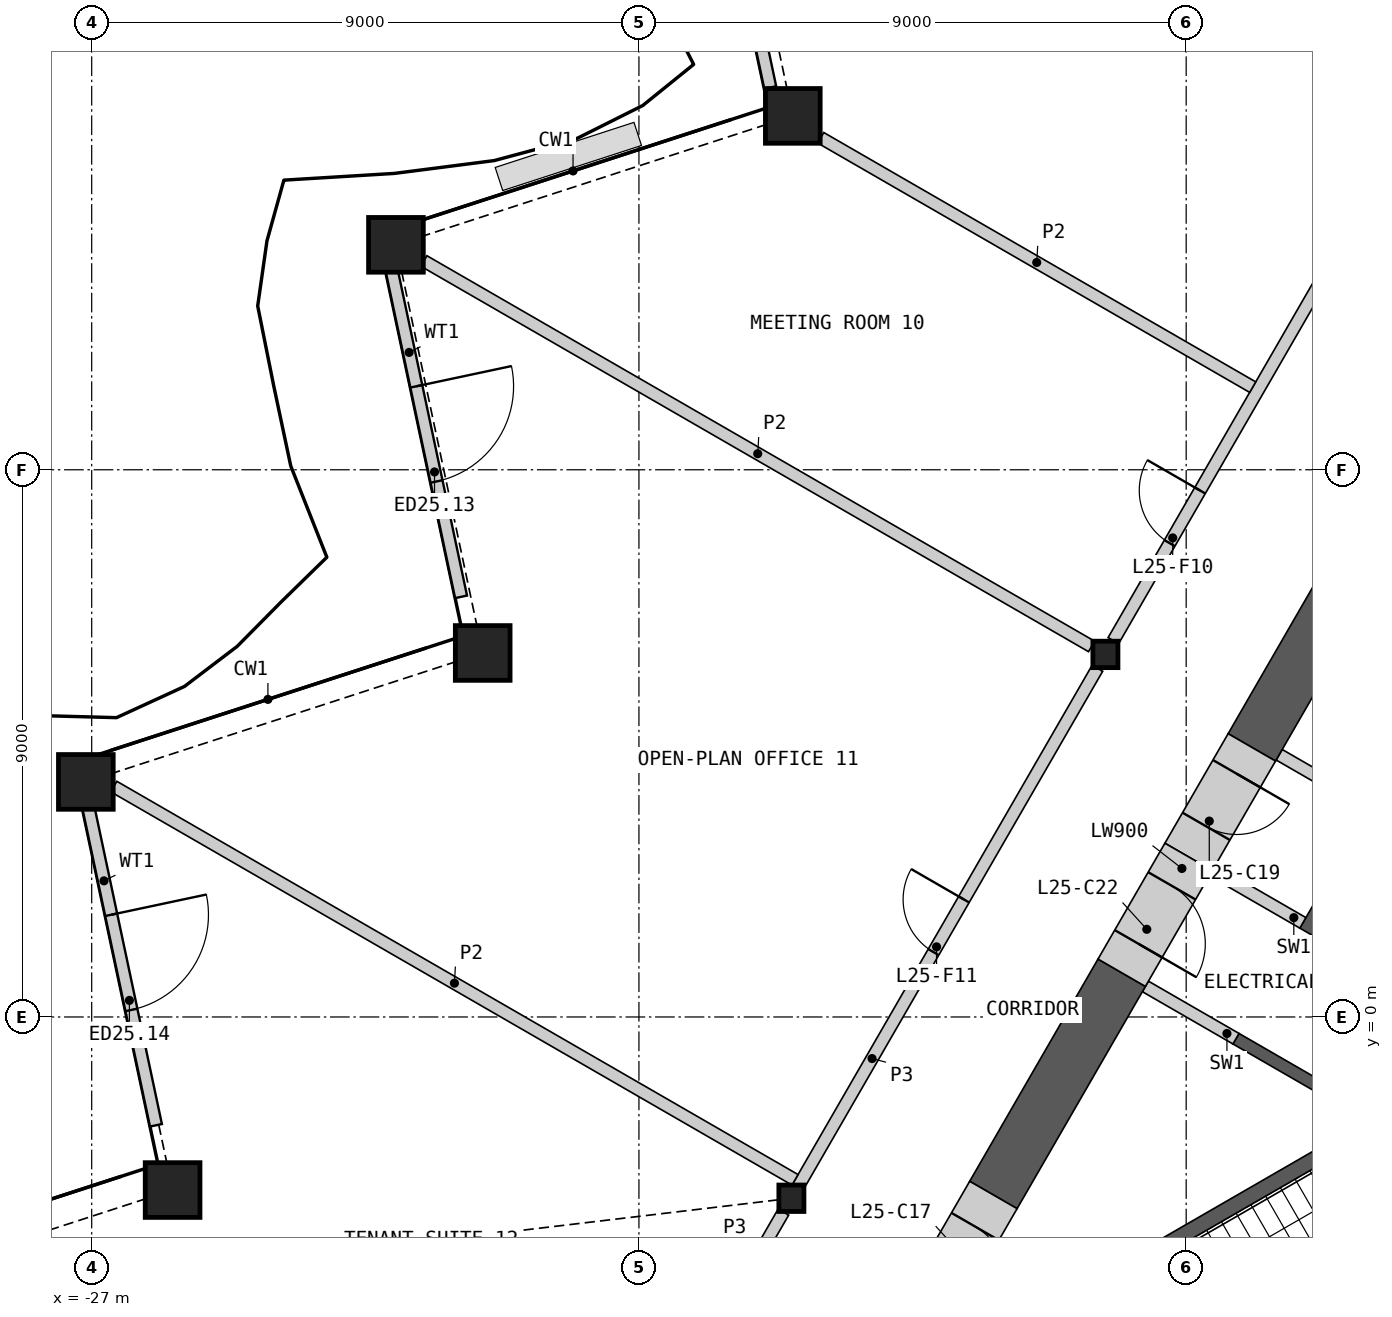
"""IFC4 building model, lengths in metres.
Left out: names, types, materials, properties, quantities, classifications, styles, units other than length and angle.
Written with IfcOpenShell. Run it as: python <this file> out.ifc"""

import sys

from ifc_helpers import new_model, si_unit, direction, frame, frame_2d, origin, origin_2d, place, context, subcontext, project, spatial, polyline, rectangle, hollow_rectangle, i_section, outline, extrude, element, fill, save


model = new_model("IFC4")
c1 = context("Model", 3, precision=1e-05, world=origin(), true_north=direction((0.0, 1.0)))
c2 = subcontext(c1, "Body", "Model", "MODEL_VIEW")
j1 = project(units=[si_unit("LENGTHUNIT", "METRE"), si_unit("PLANEANGLEUNIT", "RADIAN")], contexts=[c1])
p1 = place(None, origin())
s1 = spatial("IfcSite", under=j1, at=p1, CompositionType="ELEMENT")
p2 = place(p1, origin())
s2 = spatial("IfcBuilding", under=s1, at=p2, CompositionType="ELEMENT")
p3 = place(p2, frame((0.0, 0.0, 120.6)))
s3 = spatial("IfcBuildingStorey", under=s2, at=p3, CompositionType="ELEMENT", Elevation=120.6)
for number, where, z_axis, x_axis in (
    (1, (-15.469, 14.82, 0.0), (0.0, 0.0, 1.0), (1.0, 0.0, 0.0)),
    (2, (-21.996, 12.699, 0.0), (0.0, 0.0, 1.0), (1.0, 0.0, 0.0)),
    (3, (-20.57, 5.987, 0.0), (0.0, 0.0, 1.0), (1.0, 0.0, 0.0)),
    (4, (-27.096, 3.866, 0.0), (0.0, 0.0, 1.0), (1.0, 0.0, 0.0)),
    (5, (-25.669, -2.846, 0.0), (0.0, 0.0, 1.0), (1.0, 0.0, 0.0)),
):
    element("IfcColumn", number, at=place(p3, frame(where, z_axis=z_axis, x_axis=x_axis)), inside=s3, PredefinedType="COLUMN", context=c2, shape_type="SweptSolid", body=[
        extrude(hollow_rectangle(XDim=0.9, YDim=0.9, WallThickness=0.06, at=origin_2d()), origin(), (0.0, 0.0, 1.0), 4.2),
    ])
for number, where, z_axis, x_axis in (
    (6, (-10.328, 5.963, 0.0), (0.0, 0.0, 1.0), (1.0, 0.0, 0.0)),
    (7, (-15.493, -2.982, 0.0), (0.0, 0.0, 1.0), (1.0, 0.0, 0.0)),
):
    element("IfcColumn", number, at=place(p3, frame(where, z_axis=z_axis, x_axis=x_axis)), inside=s3, PredefinedType="COLUMN", context=c2, shape_type="SweptSolid", body=[
        extrude(i_section(OverallWidth=0.412, OverallDepth=0.435, WebThickness=0.036, FlangeThickness=0.057, at=origin_2d()), origin(), (0.0, 0.0, 1.0), 4.2),
    ])
p4 = place(p3, frame((-17.069, 21.066, 0.0), z_axis=(0.0, 0.0, 1.0), x_axis=(0.207917562075, -0.978146352741, 0.0)))
e8 = element("IfcWall", 8, at=p4, inside=s3, PredefinedType="SOLIDWALL", context=c2, shape_type="SweptSolid", body=[
    extrude(rectangle(XDim=5.909, YDim=0.2, at=frame_2d((2.954, 0.0))), origin(), (0.0, 0.0, 1.0), 3.189),
])
p5 = place(p4, frame((2.047, 0.0, 0.0)))
e9 = element("IfcOpeningElement", 9, at=p5, cuts=e8, PredefinedType="OPENING", context=c2, shape_type="SweptSolid", body=[
    extrude(rectangle(XDim=1.6, YDim=2.4, at=frame_2d((0.8, 1.2))), frame((0.0, 0.11, 0.0), z_axis=(0.0, -1.0, 0.0), x_axis=(1.0, 0.0, 0.0)), (0.0, 0.0, 1.0), 0.22),
])
p6 = place(p3, frame((-22.065, 12.271, 0.0), z_axis=(0.0, 0.0, 1.0), x_axis=(0.207907239961, -0.978148546782, 0.0)))
e10 = element("IfcWall", 10, at=p6, inside=s3, PredefinedType="SOLIDWALL", context=c2, shape_type="SweptSolid", body=[
    extrude(rectangle(XDim=5.48, YDim=0.2, at=frame_2d((2.74, 0.0))), origin(), (0.0, 0.0, 1.0), 3.189),
])
p7 = place(p6, frame((1.94, 0.0, 0.0)))
e11 = element("IfcOpeningElement", 11, at=p7, cuts=e10, PredefinedType="OPENING", context=c2, shape_type="SweptSolid", body=[
    extrude(rectangle(XDim=1.6, YDim=2.4, at=frame_2d((0.8, 1.2))), frame((0.0, 0.11, 0.0), z_axis=(0.0, -1.0, 0.0), x_axis=(1.0, 0.0, 0.0)), (0.0, 0.0, 1.0), 0.22),
])
p8 = place(p3, frame((-27.083, 3.579, 0.0), z_axis=(0.0, 0.0, 1.0), x_axis=(0.207898180805, -0.978150472278, 0.0)))
e12 = element("IfcWall", 12, at=p8, inside=s3, PredefinedType="SOLIDWALL", context=c2, shape_type="SweptSolid", body=[
    extrude(rectangle(XDim=5.48, YDim=0.2, at=frame_2d((2.74, 0.0))), origin(), (0.0, 0.0, 1.0), 3.189),
])
p9 = place(p8, frame((1.94, 0.0, 0.0)))
e13 = element("IfcOpeningElement", 13, at=p9, cuts=e12, PredefinedType="OPENING", context=c2, shape_type="SweptSolid", body=[
    extrude(rectangle(XDim=1.6, YDim=2.4, at=frame_2d((0.8, 1.2))), frame((0.0, 0.11, 0.0), z_axis=(0.0, -1.0, 0.0), x_axis=(1.0, 0.0, 0.0)), (0.0, 0.0, 1.0), 0.22),
])
p10 = place(p3, origin())
e14 = element("IfcWall", 14, at=p10, inside=s3, PredefinedType="SHEAR", context=c2, shape_type="SweptSolid", body=[
    extrude(outline(polyline([(-6.061, -1.697), (-8.231, -0.444), (-8.131, -0.271), (-5.96, -1.524), (-6.061, -1.697)])), origin(), (0.0, 0.0, 1.0), 3.8),
])
p11 = place(p3, origin())
e15 = element("IfcWall", 15, at=p11, inside=s3, PredefinedType="SHEAR", context=c2, shape_type="SweptSolid", body=[
    extrude(outline(polyline([(-4.96, 0.208), (-7.131, 1.461), (-5.931, 3.54), (-3.76, 2.287), (-3.861, 2.113), (-5.852, 3.263), (-6.852, 1.531), (-4.861, 0.381), (-4.96, 0.208)])), origin(), (0.0, 0.0, 1.0), 3.8),
])
p12 = place(p3, frame((-5.981, 3.453, 0.0), z_axis=(0.0, 0.0, 1.0), x_axis=(-0.866060346521, 0.499939472521, 0.0)))
e16 = element("IfcWall", 16, at=p12, inside=s3, PredefinedType="SHEAR", context=c2, shape_type="SweptSolid", body=[
    extrude(rectangle(XDim=1.72, YDim=0.2, at=frame_2d((0.86, 0.0))), origin(), (0.0, 0.0, 1.0), 3.8),
])
for number, where, z_axis, x_axis in (
    (17, (-7.081, 1.548, 0.0), (0.0, 0.0, 1.0), (-0.866, 0.5, 0.0)),
    (18, (-8.181, -0.357, 0.0), (0.0, 0.0, 1.0), (-0.866, 0.5, 0.0)),
):
    element("IfcWall", number, at=place(p3, frame(where, z_axis=z_axis, x_axis=x_axis)), inside=s3, PredefinedType="SHEAR", context=c2, shape_type="SweptSolid", body=[
        extrude(rectangle(XDim=1.72, YDim=0.2, at=frame_2d((0.86, 0.0))), origin(), (0.0, 0.0, 1.0), 3.8),
    ])
p13 = place(p3, origin())
e19 = element("IfcWall", 19, at=p13, inside=s3, PredefinedType="SHEAR", context=c2, shape_type="SweptSolid", body=[
    extrude(outline(polyline([(-5.307, -1.281), (-10.374, -4.206), (-10.032, -4.298), (-5.182, -1.498), (-5.307, -1.281)])), origin(), (0.0, 0.0, 1.0), 3.8),
])
p14 = place(p3, frame((-3.55, 12.004, 0.0), z_axis=(0.0, 0.0, 1.0), x_axis=(-0.499993245289, -0.866029303583, 0.0)))
e20 = element("IfcWall", 20, at=p14, inside=s3, PredefinedType="SHEAR", context=c2, shape_type="SweptSolid", body=[
    extrude(rectangle(XDim=8.741, YDim=0.9, at=frame_2d((4.37, 0.0))), origin(), (0.0, 0.0, 1.0), 3.8),
])
p15 = place(p3, frame((-10.06, 0.728, 0.0), z_axis=(0.0, 0.0, 1.0), x_axis=(-0.500021220092, -0.866013152012, 0.0)))
e21 = element("IfcWall", 21, at=p15, inside=s3, PredefinedType="SHEAR", context=c2, shape_type="SweptSolid", body=[
    extrude(rectangle(XDim=4.22, YDim=0.9, at=frame_2d((2.11, 0.0))), origin(), (0.0, 0.0, 1.0), 3.8),
])
p16 = place(p3, frame((-12.171, -2.927, 0.0), z_axis=(0.0, 0.0, 1.0), x_axis=(-0.499946605688, -0.86605622881, 0.0)))
e22 = element("IfcWall", 22, at=p16, inside=s3, PredefinedType="SHEAR", context=c2, shape_type="SweptSolid", body=[
    extrude(rectangle(XDim=2.2, YDim=0.9, at=frame_2d((1.1, 0.0))), origin(), (0.0, 0.0, 1.0), 3.8),
])
p17 = place(p16, frame((0.6, 0.0, 0.0)))
e23 = element("IfcOpeningElement", 23, at=p17, cuts=e22, PredefinedType="OPENING", context=c2, shape_type="SweptSolid", body=[
    extrude(rectangle(XDim=1.0, YDim=2.1, at=frame_2d((0.5, 1.05))), frame((0.0, 0.46, 0.0), z_axis=(0.0, -1.0, 0.0), x_axis=(1.0, 0.0, 0.0)), (0.0, 0.0, 1.0), 0.92),
])
p18 = place(p3, frame((-7.92, 4.434, 0.0), z_axis=(0.0, 0.0, 1.0), x_axis=(-0.499939227269, -0.866060488094, 0.0)))
e24 = element("IfcWall", 24, at=p18, inside=s3, PredefinedType="SHEAR", context=c2, shape_type="SweptSolid", body=[
    extrude(rectangle(XDim=2.08, YDim=0.9, at=frame_2d((1.04, 0.0))), origin(), (0.0, 0.0, 1.0), 3.8),
])
p19 = place(p18, frame((0.5, 0.0, 0.0)))
e25 = element("IfcOpeningElement", 25, at=p19, cuts=e24, PredefinedType="OPENING", context=c2, shape_type="SweptSolid", body=[
    extrude(rectangle(XDim=1.0, YDim=2.1, at=frame_2d((0.5, 1.05))), frame((0.0, 0.46, 0.0), z_axis=(0.0, -1.0, 0.0), x_axis=(1.0, 0.0, 0.0)), (0.0, 0.0, 1.0), 0.92),
])
p20 = place(p3, frame((-8.96, 2.633, 0.0), z_axis=(0.0, 0.0, 1.0), x_axis=(-0.50002983664, -0.866008176907, 0.0)))
e26 = element("IfcWall", 26, at=p20, inside=s3, PredefinedType="SHEAR", context=c2, shape_type="SweptSolid", body=[
    extrude(rectangle(XDim=2.2, YDim=0.9, at=frame_2d((1.1, 0.0))), origin(), (0.0, 0.0, 1.0), 3.8),
])
p21 = place(p20, frame((0.55, 0.0, 0.0)))
e27 = element("IfcOpeningElement", 27, at=p21, cuts=e26, PredefinedType="OPENING", context=c2, shape_type="SweptSolid", body=[
    extrude(rectangle(XDim=1.1, YDim=2.1, at=frame_2d((0.55, 1.05))), frame((0.0, 0.46, 0.0), z_axis=(0.0, -1.0, 0.0), x_axis=(1.0, 0.0, 0.0)), (0.0, 0.0, 1.0), 0.92),
])
p22 = place(p3, frame((-10.197, 6.19, 0.0), z_axis=(0.0, 0.0, 1.0), x_axis=(0.500012035596, 0.866018454918, 0.0)))
e28 = element("IfcWall", 28, at=p22, inside=s3, PredefinedType="PARTITIONING", context=c2, shape_type="SweptSolid", body=[
    extrude(rectangle(XDim=9.803, YDim=0.2, at=frame_2d((4.902, 0.0))), origin(), (0.0, 0.0, 1.0), 3.8),
])
p23 = place(p22, frame((1.851, 0.0, 0.0)))
e29 = element("IfcOpeningElement", 29, at=p23, cuts=e28, PredefinedType="OPENING", context=c2, shape_type="SweptSolid", body=[
    extrude(rectangle(XDim=1.0, YDim=2.1, at=frame_2d((0.5, 1.05))), frame((0.0, 0.11, 0.0), z_axis=(0.0, -1.0, 0.0), x_axis=(1.0, 0.0, 0.0)), (0.0, 0.0, 1.0), 0.22),
])
p24 = place(p3, frame((-15.402, -2.823, 0.0), z_axis=(0.0, 0.0, 1.0), x_axis=(0.500023237168, 0.866011987384, 0.0)))
e30 = element("IfcWall", 30, at=p24, inside=s3, PredefinedType="PARTITIONING", context=c2, shape_type="SweptSolid", body=[
    extrude(rectangle(XDim=9.883, YDim=0.2, at=frame_2d((4.942, 0.0))), origin(), (0.0, 0.0, 1.0), 3.8),
])
p25 = place(p24, frame((4.492, 0.0, 0.0)))
e31 = element("IfcOpeningElement", 31, at=p25, cuts=e30, PredefinedType="OPENING", context=c2, shape_type="SweptSolid", body=[
    extrude(rectangle(XDim=1.0, YDim=2.1, at=frame_2d((0.5, 1.05))), frame((0.0, 0.11, 0.0), z_axis=(0.0, -1.0, 0.0), x_axis=(1.0, 0.0, 0.0)), (0.0, 0.0, 1.0), 0.22),
])
p26 = place(p3, frame((-18.744, -8.613, 0.0), z_axis=(0.0, 0.0, 1.0), x_axis=(0.499997920671, 0.866026604282, 0.0)))
e32 = element("IfcWall", 32, at=p26, inside=s3, PredefinedType="PARTITIONING", context=c2, shape_type="SweptSolid", body=[
    extrude(rectangle(XDim=6.24, YDim=0.2, at=frame_2d((3.12, 0.0))), origin(), (0.0, 0.0, 1.0), 3.8),
])
p27 = place(p26, frame((2.67, 0.0, 0.0)))
e33 = element("IfcOpeningElement", 33, at=p27, cuts=e32, PredefinedType="OPENING", context=c2, shape_type="SweptSolid", body=[
    extrude(rectangle(XDim=1.0, YDim=2.1, at=frame_2d((0.5, 1.05))), frame((0.0, 0.11, 0.0), z_axis=(0.0, -1.0, 0.0), x_axis=(1.0, 0.0, 0.0)), (0.0, 0.0, 1.0), 0.22),
])
p28 = place(p3, frame((-26.636, 3.79, 0.0), z_axis=(0.0, 0.0, 1.0), x_axis=(0.866029074283, -0.499993642455, 0.0)))
e34 = element("IfcWall", 34, at=p28, inside=s3, PredefinedType="PARTITIONING", context=c2, shape_type="SweptSolid", body=[
    extrude(rectangle(XDim=12.936, YDim=0.2, at=frame_2d((6.468, 0.0))), origin(), (0.0, 0.0, 1.0), 2.885),
])
p29 = place(p3, frame((-21.536, 12.434, 0.0), z_axis=(0.0, 0.0, 1.0), x_axis=(0.86602461759, -0.500001361726, 0.0)))
e35 = element("IfcWall", 35, at=p29, inside=s3, PredefinedType="PARTITIONING", context=c2, shape_type="SweptSolid", body=[
    extrude(rectangle(XDim=12.679, YDim=0.2, at=frame_2d((6.34, 0.0))), origin(), (0.0, 0.0, 1.0), 2.885),
])
p30 = place(p3, frame((-15.01, 14.46, 0.0), z_axis=(0.0, 0.0, 1.0), x_axis=(0.86602003489, -0.500009299083, 0.0)))
e36 = element("IfcWall", 36, at=p30, inside=s3, PredefinedType="PARTITIONING", context=c2, shape_type="SweptSolid", body=[
    extrude(rectangle(XDim=8.202, YDim=0.2, at=frame_2d((4.101, 0.0))), origin(), (0.0, 0.0, 1.0), 2.885),
])
p31 = place(p7, origin())
e37 = element("IfcDoor", 37, at=p31, inside=s3, OperationType="DOUBLE_DOOR_SINGLE_SWING", PredefinedType="DOOR", context=c2, shape_type="SweptSolid", body=[
    extrude(rectangle(XDim=1.6, YDim=2.4, at=frame_2d((0.8, 1.2))), frame((0.0, 0.025, 0.0), z_axis=(0.0, -1.0, 0.0), x_axis=(1.0, 0.0, 0.0)), (0.0, 0.0, 1.0), 0.05),
])
fill(e11, e37)
p32 = place(p9, origin())
e38 = element("IfcDoor", 38, at=p32, inside=s3, OperationType="DOUBLE_DOOR_SINGLE_SWING", PredefinedType="DOOR", context=c2, shape_type="SweptSolid", body=[
    extrude(rectangle(XDim=1.6, YDim=2.4, at=frame_2d((0.8, 1.2))), frame((0.0, 0.025, 0.0), z_axis=(0.0, -1.0, 0.0), x_axis=(1.0, 0.0, 0.0)), (0.0, 0.0, 1.0), 0.05),
])
fill(e13, e38)
p33 = place(p17, origin())
e39 = element("IfcDoor", 39, at=p33, inside=s3, OperationType="SINGLE_SWING_RIGHT", PredefinedType="DOOR", context=c2, shape_type="SweptSolid", body=[
    extrude(rectangle(XDim=1.0, YDim=2.1, at=frame_2d((0.5, 1.05))), frame((0.0, 0.205, 0.0), z_axis=(0.0, -1.0, 0.0), x_axis=(1.0, 0.0, 0.0)), (0.0, 0.0, 1.0), 0.05),
])
fill(e23, e39)
p34 = place(p19, origin())
e40 = element("IfcDoor", 40, at=p34, inside=s3, OperationType="SINGLE_SWING_LEFT", PredefinedType="DOOR", context=c2, shape_type="SweptSolid", body=[
    extrude(rectangle(XDim=1.0, YDim=2.1, at=frame_2d((0.5, 1.05))), frame((0.0, 0.205, 0.0), z_axis=(0.0, -1.0, 0.0), x_axis=(1.0, 0.0, 0.0)), (0.0, 0.0, 1.0), 0.05),
])
fill(e25, e40)
p35 = place(p21, origin())
e41 = element("IfcDoor", 41, at=p35, inside=s3, OperationType="SINGLE_SWING_RIGHT", PredefinedType="DOOR", context=c2, shape_type="SweptSolid", body=[
    extrude(rectangle(XDim=1.1, YDim=2.1, at=frame_2d((0.55, 1.05))), frame((0.0, 0.205, 0.0), z_axis=(0.0, -1.0, 0.0), x_axis=(1.0, 0.0, 0.0)), (0.0, 0.0, 1.0), 0.05),
])
fill(e27, e41)
p36 = place(p23, origin())
e42 = element("IfcDoor", 42, at=p36, inside=s3, OperationType="SINGLE_SWING_RIGHT", PredefinedType="DOOR", context=c2, shape_type="SweptSolid", body=[
    extrude(rectangle(XDim=1.0, YDim=2.1, at=frame_2d((0.5, 1.05))), frame((0.0, 0.025, 0.0), z_axis=(0.0, -1.0, 0.0), x_axis=(1.0, 0.0, 0.0)), (0.0, 0.0, 1.0), 0.05),
])
fill(e29, e42)
p37 = place(p25, origin())
e43 = element("IfcDoor", 43, at=p37, inside=s3, OperationType="SINGLE_SWING_RIGHT", PredefinedType="DOOR", context=c2, shape_type="SweptSolid", body=[
    extrude(rectangle(XDim=1.0, YDim=2.1, at=frame_2d((0.5, 1.05))), frame((0.0, 0.025, 0.0), z_axis=(0.0, -1.0, 0.0), x_axis=(1.0, 0.0, 0.0)), (0.0, 0.0, 1.0), 0.05),
])
fill(e31, e43)
save(model, sys.argv[1])
